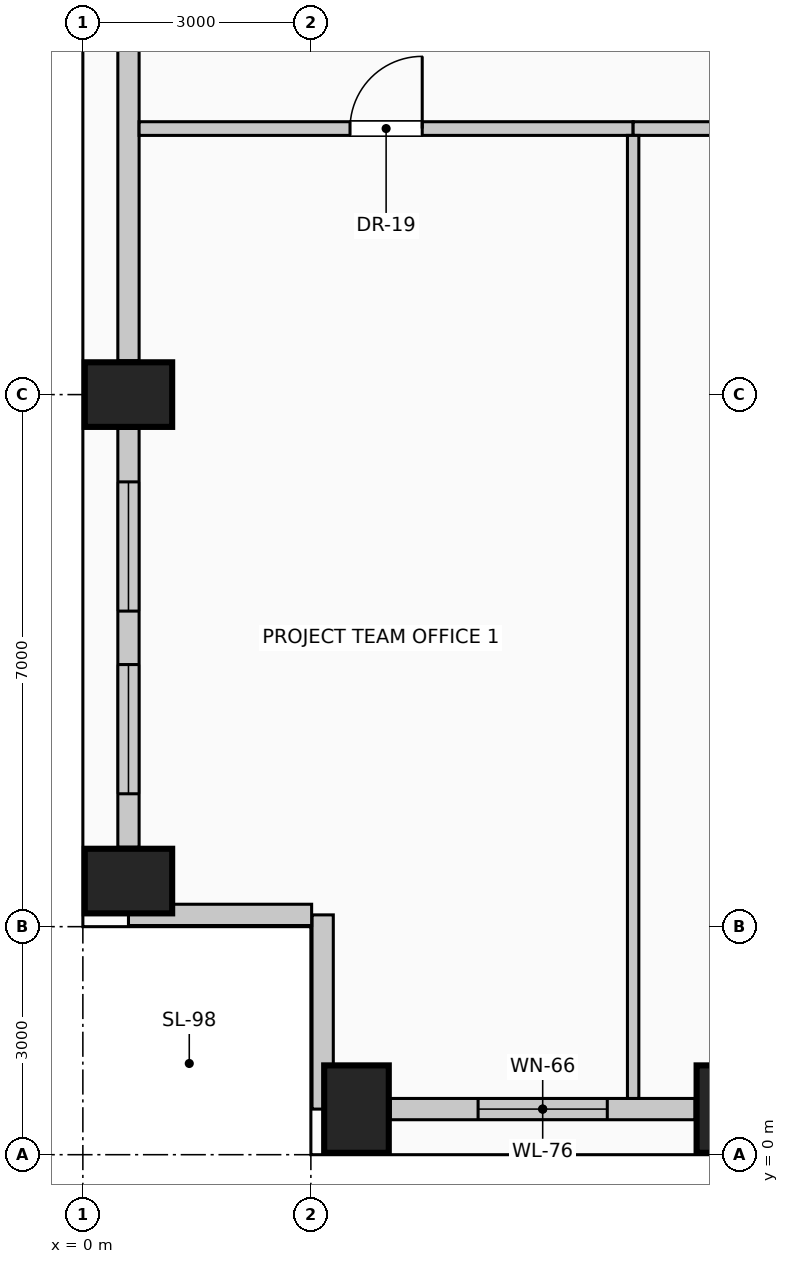
"""IFC4 building model, lengths in metres.
Left out: names, types, materials, properties, quantities, classifications, styles, units other than length and angle.
Written with IfcOpenShell. Run it as: python <this file> out.ifc"""

import sys

from ifc_helpers import new_model, si_unit, direction, frame, frame_2d, origin, origin_2d, place, context, subcontext, project, spatial, rectangle, extrude, element, fill, save


model = new_model("IFC4")
c1 = context("Model", 3, precision=1e-05, world=origin(), true_north=direction((0.0, 1.0)))
c2 = subcontext(c1, "Body", "Model", "MODEL_VIEW")
j1 = project(units=[si_unit("LENGTHUNIT", "METRE"), si_unit("PLANEANGLEUNIT", "RADIAN")], contexts=[c1])
p1 = place(None, origin())
s1 = spatial("IfcSite", under=j1, at=p1, CompositionType="ELEMENT")
p2 = place(p1, origin())
s2 = spatial("IfcBuilding", under=s1, at=p2, CompositionType="ELEMENT")
p3 = place(p2, frame((0.0, 0.0, 144.6)))
s3 = spatial("IfcBuildingStorey", under=s2, at=p3, CompositionType="ELEMENT", Elevation=144.6)
for number, where, z_axis, x_axis in (
    (1, (3.6, 0.6, 0.0), (0.0, 0.0, 1.0), (1.0, 0.0, 0.0)),
    (2, (8.5, 0.6, 0.0), (0.0, 0.0, 1.0), (1.0, 0.0, 0.0)),
    (3, (0.6, 3.6, 0.0), (0.0, 0.0, 1.0), (0.0, 1.0, 0.0)),
    (4, (0.6, 10.0, 0.0), (0.0, 0.0, 1.0), (0.0, 1.0, 0.0)),
):
    element("IfcColumn", number, at=place(p3, frame(where, z_axis=z_axis, x_axis=x_axis)), inside=s3, PredefinedType="COLUMN", context=c2, shape_type="SweptSolid", body=[
        extrude(rectangle(XDim=0.85, YDim=1.15, at=origin_2d()), origin(), (0.0, 0.0, 1.0), 4.0),
    ])
p4 = place(p3, frame((8.055, 0.6, 0.0), z_axis=(0.0, 0.0, 1.0), x_axis=(-1.0, 0.0, 0.0)))
e5 = element("IfcWall", 5, at=p4, inside=s3, PredefinedType="SOLIDWALL", context=c2, shape_type="SweptSolid", body=[
    extrude(rectangle(XDim=4.01, YDim=0.28, at=frame_2d((2.005, 0.0))), origin(), (0.0, 0.0, 1.0), 2.875),
])
p5 = place(p4, frame((1.155, 0.0, 0.5)))
e6 = element("IfcOpeningElement", 6, at=p5, cuts=e5, PredefinedType="OPENING", context=c2, shape_type="SweptSolid", body=[
    extrude(rectangle(XDim=1.7, YDim=1.95, at=frame_2d((0.85, 0.975))), frame((0.0, 0.15, 0.0), z_axis=(0.0, -1.0, 0.0), x_axis=(1.0, 0.0, 0.0)), (0.0, 0.0, 1.0), 0.3),
])
p6 = place(p3, frame((0.6, 4.045, 0.0), z_axis=(0.0, 0.0, 1.0), x_axis=(0.0, 1.0, 0.0)))
e7 = element("IfcWall", 7, at=p6, inside=s3, PredefinedType="SOLIDWALL", context=c2, shape_type="SweptSolid", body=[
    extrude(rectangle(XDim=5.51, YDim=0.28, at=frame_2d((2.755, 0.0))), origin(), (0.0, 0.0, 1.0), 2.875),
])
p7 = place(p6, frame((0.703, 0.0, 0.5)))
e8 = element("IfcOpeningElement", 8, at=p7, cuts=e7, PredefinedType="OPENING", context=c2, shape_type="SweptSolid", body=[
    extrude(rectangle(XDim=1.7, YDim=1.95, at=frame_2d((0.85, 0.975))), frame((0.0, 0.15, 0.0), z_axis=(0.0, -1.0, 0.0), x_axis=(1.0, 0.0, 0.0)), (0.0, 0.0, 1.0), 0.3),
])
p8 = place(p6, frame((3.107, 0.0, 0.5)))
e9 = element("IfcOpeningElement", 9, at=p8, cuts=e7, PredefinedType="OPENING", context=c2, shape_type="SweptSolid", body=[
    extrude(rectangle(XDim=1.7, YDim=1.95, at=frame_2d((0.85, 0.975))), frame((0.0, 0.15, 0.0), z_axis=(0.0, -1.0, 0.0), x_axis=(1.0, 0.0, 0.0)), (0.0, 0.0, 1.0), 0.3),
])
p9 = place(p3, frame((0.6, 10.445, 0.0), z_axis=(0.0, 0.0, 1.0), x_axis=(0.0, 1.0, 0.0)))
e10 = element("IfcWall", 10, at=p9, inside=s3, PredefinedType="SOLIDWALL", context=c2, shape_type="SweptSolid", body=[
    extrude(rectangle(XDim=7.11, YDim=0.28, at=frame_2d((3.555, 0.0))), origin(), (0.0, 0.0, 1.0), 2.875),
])
p10 = place(p3, frame((3.155, 0.6, 0.0), z_axis=(0.0, 0.0, 1.0), x_axis=(0.0, 1.0, 0.0)))
e11 = element("IfcWall", 11, at=p10, inside=s3, PredefinedType="SOLIDWALL", context=c2, shape_type="SweptSolid", body=[
    extrude(rectangle(XDim=2.555, YDim=0.28, at=frame_2d((1.277, 0.0))), origin(), (0.0, 0.0, 1.0), 3.725),
])
p11 = place(p3, frame((3.01, 3.155, 0.0), z_axis=(0.0, 0.0, 1.0), x_axis=(-1.0, 0.0, 0.0)))
e12 = element("IfcWall", 12, at=p11, inside=s3, PredefinedType="SOLIDWALL", context=c2, shape_type="SweptSolid", body=[
    extrude(rectangle(XDim=2.41, YDim=0.28, at=frame_2d((1.205, 0.0))), origin(), (0.0, 0.0, 1.0), 3.725),
])
p12 = place(p3, frame((0.74, 13.5, 0.0), z_axis=(0.0, 0.0, 1.0), x_axis=(1.0, 0.0, 0.0)))
e13 = element("IfcWall", 13, at=p12, inside=s3, PredefinedType="PARTITIONING", context=c2, shape_type="SweptSolid", body=[
    extrude(rectangle(XDim=6.5, YDim=0.18, at=frame_2d((3.25, 0.0))), origin(), (0.0, 0.0, 1.0), 3.725),
])
p13 = place(p12, frame((2.775, 0.0, 0.0)))
e14 = element("IfcOpeningElement", 14, at=p13, cuts=e13, PredefinedType="OPENING", context=c2, shape_type="SweptSolid", body=[
    extrude(rectangle(XDim=0.95, YDim=2.15, at=frame_2d((0.475, 1.075))), frame((0.0, 0.1, 0.0), z_axis=(0.0, -1.0, 0.0), x_axis=(1.0, 0.0, 0.0)), (0.0, 0.0, 1.0), 0.2),
])
p14 = place(p3, frame((7.24, 13.5, 0.0), z_axis=(0.0, 0.0, 1.0), x_axis=(1.0, 0.0, 0.0)))
e15 = element("IfcWall", 15, at=p14, inside=s3, PredefinedType="PARTITIONING", context=c2, shape_type="SweptSolid", body=[
    extrude(rectangle(XDim=5.6, YDim=0.18, at=frame_2d((2.8, 0.0))), origin(), (0.0, 0.0, 1.0), 3.725),
])
p15 = place(p14, frame((2.275, 0.0, 0.0)))
e16 = element("IfcOpeningElement", 16, at=p15, cuts=e15, PredefinedType="OPENING", context=c2, shape_type="SweptSolid", body=[
    extrude(rectangle(XDim=1.05, YDim=2.15, at=frame_2d((0.525, 1.075))), frame((0.0, 0.1, 0.0), z_axis=(0.0, -1.0, 0.0), x_axis=(1.0, 0.0, 0.0)), (0.0, 0.0, 1.0), 0.2),
])
p16 = place(p3, frame((7.24, 0.74, 0.0), z_axis=(0.0, 0.0, 1.0), x_axis=(0.0, 1.0, 0.0)))
e17 = element("IfcWall", 17, at=p16, inside=s3, PredefinedType="PARTITIONING", context=c2, shape_type="SweptSolid", body=[
    extrude(rectangle(XDim=12.67, YDim=0.15, at=frame_2d((6.335, 0.0))), origin(), (0.0, 0.0, 1.0), 3.725),
])
p17 = place(p5, origin())
e18 = element("IfcWindow", 18, at=p17, inside=s3, PartitioningType="SINGLE_PANEL", PredefinedType="WINDOW", context=c2, shape_type="SweptSolid", body=[
    extrude(rectangle(XDim=1.7, YDim=1.95, at=frame_2d((0.85, 0.975))), frame((0.0, 0.03, 0.0), z_axis=(0.0, -1.0, 0.0), x_axis=(1.0, 0.0, 0.0)), (0.0, 0.0, 1.0), 0.06),
])
fill(e6, e18)
p18 = place(p7, origin())
e19 = element("IfcWindow", 19, at=p18, inside=s3, PartitioningType="SINGLE_PANEL", PredefinedType="WINDOW", context=c2, shape_type="SweptSolid", body=[
    extrude(rectangle(XDim=1.7, YDim=1.95, at=frame_2d((0.85, 0.975))), frame((0.0, 0.03, 0.0), z_axis=(0.0, -1.0, 0.0), x_axis=(1.0, 0.0, 0.0)), (0.0, 0.0, 1.0), 0.06),
])
fill(e8, e19)
p19 = place(p8, origin())
e20 = element("IfcWindow", 20, at=p19, inside=s3, PartitioningType="SINGLE_PANEL", PredefinedType="WINDOW", context=c2, shape_type="SweptSolid", body=[
    extrude(rectangle(XDim=1.7, YDim=1.95, at=frame_2d((0.85, 0.975))), frame((0.0, 0.03, 0.0), z_axis=(0.0, -1.0, 0.0), x_axis=(1.0, 0.0, 0.0)), (0.0, 0.0, 1.0), 0.06),
])
fill(e9, e20)
p20 = place(p13, origin())
e21 = element("IfcDoor", 21, at=p20, inside=s3, OperationType="SINGLE_SWING_RIGHT", PredefinedType="DOOR", context=c2, shape_type="SweptSolid", body=[
    extrude(rectangle(XDim=0.95, YDim=2.15, at=frame_2d((0.475, 1.075))), frame((0.0, 0.025, 0.0), z_axis=(0.0, -1.0, 0.0), x_axis=(1.0, 0.0, 0.0)), (0.0, 0.0, 1.0), 0.05),
])
fill(e14, e21)
save(model, sys.argv[1])
